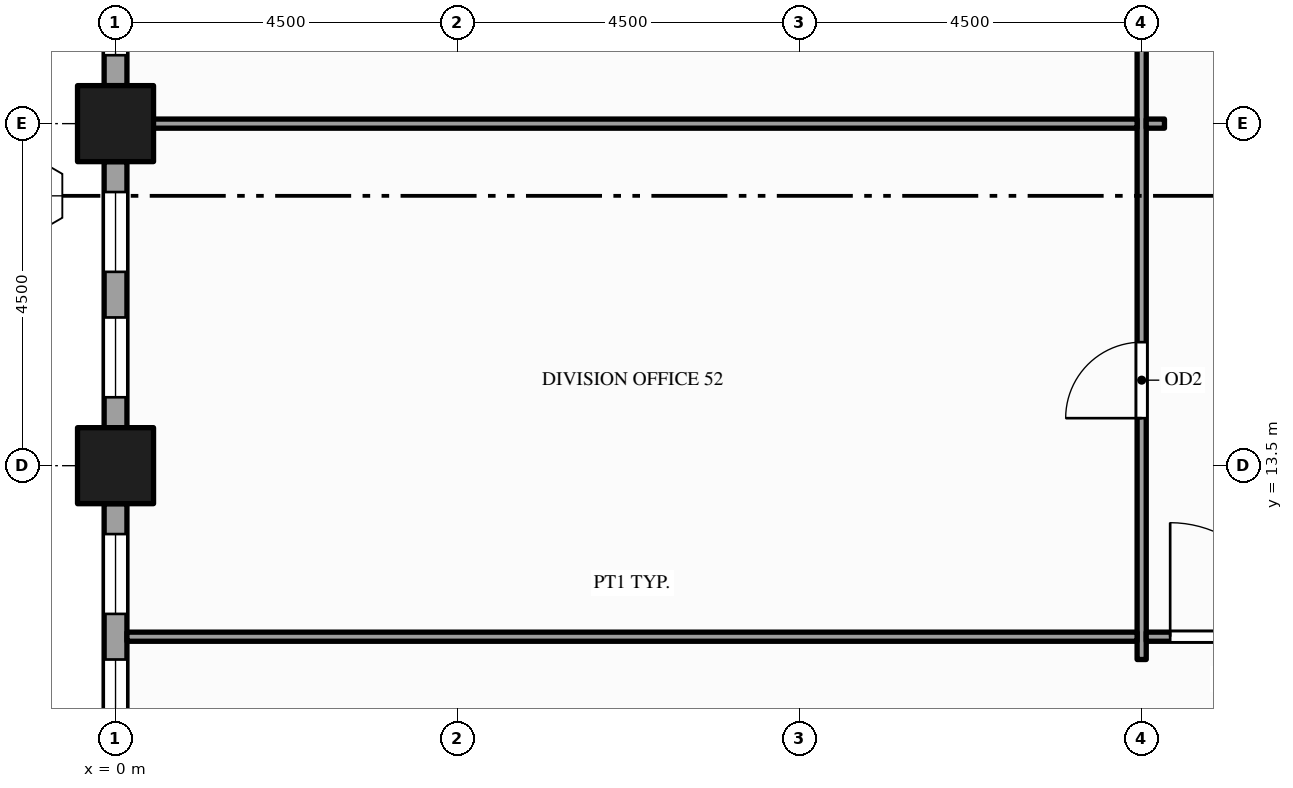
"""IFC4 building model, lengths in metres.
Left out: names, types, materials, properties, quantities, classifications, styles, units other than length and angle.
Written with IfcOpenShell. Run it as: python <this file> out.ifc"""

import sys

from ifc_helpers import new_model, si_unit, direction, frame, frame_2d, origin, origin_2d, place, context, subcontext, project, spatial, rectangle, hollow_rectangle, extrude, element, fill, save


model = new_model("IFC4")
c1 = context("Model", 3, precision=1e-05, world=origin(), true_north=direction((0.0, 1.0)))
c2 = subcontext(c1, "Body", "Model", "MODEL_VIEW")
j1 = project(units=[si_unit("LENGTHUNIT", "METRE"), si_unit("PLANEANGLEUNIT", "RADIAN")], contexts=[c1])
p1 = place(None, origin())
s1 = spatial("IfcSite", under=j1, at=p1, CompositionType="ELEMENT")
p2 = place(p1, origin())
s2 = spatial("IfcBuilding", under=s1, at=p2, CompositionType="ELEMENT")
p3 = place(p2, frame((0.0, 0.0, 119.0)))
s3 = spatial("IfcBuildingStorey", under=s2, at=p3, CompositionType="ELEMENT", Elevation=119.0)
for number, where, z_axis, x_axis in (
    (1, (0.0, 13.5, -0.15), (0.0, 0.0, 1.0), (1.0, 0.0, 0.0)),
    (2, (0.0, 18.0, -0.15), (0.0, 0.0, 1.0), (1.0, 0.0, 0.0)),
):
    element("IfcColumn", number, at=place(p3, frame(where, z_axis=z_axis, x_axis=x_axis)), inside=s3, PredefinedType="COLUMN", context=c2, shape_type="SweptSolid", body=[
        extrude(hollow_rectangle(XDim=1.0, YDim=1.0, WallThickness=0.05, at=origin_2d()), origin(), (0.0, 0.0, 1.0), 4.0),
    ])
p4 = place(p3, frame((0.0, 22.0, 0.0), z_axis=(0.0, 0.0, 1.0), x_axis=(0.0, -1.0, 0.0)))
e3 = element("IfcWall", 3, at=p4, inside=s3, PredefinedType="STANDARD", context=c2, shape_type="SweptSolid", body=[
    extrude(rectangle(XDim=3.5, YDim=0.3, at=frame_2d((1.75, 0.0))), origin(), (0.0, 0.0, 1.0), 3.154),
])
p5 = place(p4, frame((0.4, 0.0, 0.9)))
e4 = element("IfcOpeningElement", 4, at=p5, cuts=e3, PredefinedType="OPENING", context=c2, shape_type="SweptSolid", body=[
    extrude(rectangle(XDim=1.05, YDim=2.0, at=frame_2d((0.525, 1.0))), frame((0.0, 0.16, 0.0), z_axis=(0.0, -1.0, 0.0), x_axis=(1.0, 0.0, 0.0)), (0.0, 0.0, 1.0), 0.32),
])
p6 = place(p4, frame((2.05, 0.0, 0.9)))
e5 = element("IfcOpeningElement", 5, at=p6, cuts=e3, PredefinedType="OPENING", context=c2, shape_type="SweptSolid", body=[
    extrude(rectangle(XDim=1.05, YDim=2.0, at=frame_2d((0.525, 1.0))), frame((0.0, 0.16, 0.0), z_axis=(0.0, -1.0, 0.0), x_axis=(1.0, 0.0, 0.0)), (0.0, 0.0, 1.0), 0.32),
])
p7 = place(p3, frame((0.0, 17.5, 0.0), z_axis=(0.0, 0.0, 1.0), x_axis=(0.0, -1.0, 0.0)))
e6 = element("IfcWall", 6, at=p7, inside=s3, PredefinedType="STANDARD", context=c2, shape_type="SweptSolid", body=[
    extrude(rectangle(XDim=3.5, YDim=0.3, at=frame_2d((1.75, 0.0))), origin(), (0.0, 0.0, 1.0), 3.154),
])
p8 = place(p7, frame((0.4, 0.0, 0.9)))
e7 = element("IfcOpeningElement", 7, at=p8, cuts=e6, PredefinedType="OPENING", context=c2, shape_type="SweptSolid", body=[
    extrude(rectangle(XDim=1.05, YDim=2.0, at=frame_2d((0.525, 1.0))), frame((0.0, 0.16, 0.0), z_axis=(0.0, -1.0, 0.0), x_axis=(1.0, 0.0, 0.0)), (0.0, 0.0, 1.0), 0.32),
])
p9 = place(p7, frame((2.05, 0.0, 0.9)))
e8 = element("IfcOpeningElement", 8, at=p9, cuts=e6, PredefinedType="OPENING", context=c2, shape_type="SweptSolid", body=[
    extrude(rectangle(XDim=1.05, YDim=2.0, at=frame_2d((0.525, 1.0))), frame((0.0, 0.16, 0.0), z_axis=(0.0, -1.0, 0.0), x_axis=(1.0, 0.0, 0.0)), (0.0, 0.0, 1.0), 0.32),
])
p10 = place(p3, frame((0.0, 13.0, 0.0), z_axis=(0.0, 0.0, 1.0), x_axis=(0.0, -1.0, 0.0)))
e9 = element("IfcWall", 9, at=p10, inside=s3, PredefinedType="STANDARD", context=c2, shape_type="SweptSolid", body=[
    extrude(rectangle(XDim=3.5, YDim=0.3, at=frame_2d((1.75, 0.0))), origin(), (0.0, 0.0, 1.0), 3.154),
])
p11 = place(p10, frame((0.4, 0.0, 0.9)))
e10 = element("IfcOpeningElement", 10, at=p11, cuts=e9, PredefinedType="OPENING", context=c2, shape_type="SweptSolid", body=[
    extrude(rectangle(XDim=1.05, YDim=2.0, at=frame_2d((0.525, 1.0))), frame((0.0, 0.16, 0.0), z_axis=(0.0, -1.0, 0.0), x_axis=(1.0, 0.0, 0.0)), (0.0, 0.0, 1.0), 0.32),
])
p12 = place(p10, frame((2.05, 0.0, 0.9)))
e11 = element("IfcOpeningElement", 11, at=p12, cuts=e9, PredefinedType="OPENING", context=c2, shape_type="SweptSolid", body=[
    extrude(rectangle(XDim=1.05, YDim=2.0, at=frame_2d((0.525, 1.0))), frame((0.0, 0.16, 0.0), z_axis=(0.0, -1.0, 0.0), x_axis=(1.0, 0.0, 0.0)), (0.0, 0.0, 1.0), 0.32),
])
p13 = place(p3, frame((13.5, 10.95, 0.0), z_axis=(0.0, 0.0, 1.0), x_axis=(0.0, 1.0, 0.0)))
e12 = element("IfcWall", 12, at=p13, inside=s3, PredefinedType="PARTITIONING", context=c2, shape_type="SweptSolid", body=[
    extrude(rectangle(XDim=20.85, YDim=0.12, at=frame_2d((10.425, 0.0))), origin(), (0.0, 0.0, 1.0), 2.6),
])
p14 = place(p13, frame((3.175, 0.0, 0.0)))
e13 = element("IfcOpeningElement", 13, at=p14, cuts=e12, PredefinedType="OPENING", context=c2, shape_type="SweptSolid", body=[
    extrude(rectangle(XDim=1.0, YDim=2.1, at=frame_2d((0.5, 1.05))), frame((0.0, 0.07, 0.0), z_axis=(0.0, -1.0, 0.0), x_axis=(1.0, 0.0, 0.0)), (0.0, 0.0, 1.0), 0.14),
])
p15 = place(p13, frame((10.68, 0.0, 0.0)))
e14 = element("IfcOpeningElement", 14, at=p15, cuts=e12, PredefinedType="OPENING", context=c2, shape_type="SweptSolid", body=[
    extrude(rectangle(XDim=1.8, YDim=2.1, at=frame_2d((0.9, 1.05))), frame((0.0, 0.07, 0.0), z_axis=(0.0, -1.0, 0.0), x_axis=(1.0, 0.0, 0.0)), (0.0, 0.0, 1.0), 0.14),
])
p16 = place(p3, frame((0.15, 11.25, 0.0), z_axis=(0.0, 0.0, 1.0), x_axis=(1.0, 0.0, 0.0)))
e15 = element("IfcWall", 15, at=p16, inside=s3, PredefinedType="PARTITIONING", context=c2, shape_type="SweptSolid", body=[
    extrude(rectangle(XDim=13.29, YDim=0.12, at=frame_2d((6.645, 0.0))), origin(), (0.0, 0.0, 1.0), 2.938),
])
p17 = place(p3, frame((13.56, 11.25, 0.0), z_axis=(0.0, 0.0, 1.0), x_axis=(1.0, 0.0, 0.0)))
e16 = element("IfcWall", 16, at=p17, inside=s3, PredefinedType="PARTITIONING", context=c2, shape_type="SweptSolid", body=[
    extrude(rectangle(XDim=2.13, YDim=0.12, at=frame_2d((1.065, 0.0))), origin(), (0.0, 0.0, 1.0), 2.938),
])
p18 = place(p17, frame((0.315, 0.0, 0.0)))
e17 = element("IfcOpeningElement", 17, at=p18, cuts=e16, PredefinedType="OPENING", context=c2, shape_type="SweptSolid", body=[
    extrude(rectangle(XDim=1.5, YDim=2.1, at=frame_2d((0.75, 1.05))), frame((0.0, 0.07, 0.0), z_axis=(0.0, -1.0, 0.0), x_axis=(1.0, 0.0, 0.0)), (0.0, 0.0, 1.0), 0.14),
])
p19 = place(p3, frame((0.15, 18.0, 0.0), z_axis=(0.0, 0.0, 1.0), x_axis=(1.0, 0.0, 0.0)))
e18 = element("IfcWall", 18, at=p19, inside=s3, PredefinedType="PARTITIONING", context=c2, shape_type="SweptSolid", body=[
    extrude(rectangle(XDim=13.29, YDim=0.12, at=frame_2d((6.645, 0.0))), origin(), (0.0, 0.0, 1.0), 2.938),
])
p20 = place(p3, frame((13.56, 18.0, 0.0), z_axis=(0.0, 0.0, 1.0), x_axis=(1.0, 0.0, 0.0)))
e19 = element("IfcWall", 19, at=p20, inside=s3, PredefinedType="PARTITIONING", context=c2, shape_type="SweptSolid", body=[
    extrude(rectangle(XDim=0.24, YDim=0.12, at=frame_2d((0.12, 0.0))), origin(), (0.0, 0.0, 1.0), 2.938),
])
p21 = place(p6, origin())
e20 = element("IfcWindow", 20, at=p21, inside=s3, PartitioningType="SINGLE_PANEL", PredefinedType="WINDOW", context=c2, shape_type="SweptSolid", body=[
    extrude(rectangle(XDim=1.05, YDim=2.0, at=frame_2d((0.525, 1.0))), frame((0.0, 0.03, 0.0), z_axis=(0.0, -1.0, 0.0), x_axis=(1.0, 0.0, 0.0)), (0.0, 0.0, 1.0), 0.06),
])
fill(e5, e20)
p22 = place(p8, origin())
e21 = element("IfcWindow", 21, at=p22, inside=s3, PartitioningType="SINGLE_PANEL", PredefinedType="WINDOW", context=c2, shape_type="SweptSolid", body=[
    extrude(rectangle(XDim=1.05, YDim=2.0, at=frame_2d((0.525, 1.0))), frame((0.0, 0.03, 0.0), z_axis=(0.0, -1.0, 0.0), x_axis=(1.0, 0.0, 0.0)), (0.0, 0.0, 1.0), 0.06),
])
fill(e7, e21)
p23 = place(p9, origin())
e22 = element("IfcWindow", 22, at=p23, inside=s3, PartitioningType="SINGLE_PANEL", PredefinedType="WINDOW", context=c2, shape_type="SweptSolid", body=[
    extrude(rectangle(XDim=1.05, YDim=2.0, at=frame_2d((0.525, 1.0))), frame((0.0, 0.03, 0.0), z_axis=(0.0, -1.0, 0.0), x_axis=(1.0, 0.0, 0.0)), (0.0, 0.0, 1.0), 0.06),
])
fill(e8, e22)
p24 = place(p11, origin())
e23 = element("IfcWindow", 23, at=p24, inside=s3, PartitioningType="SINGLE_PANEL", PredefinedType="WINDOW", context=c2, shape_type="SweptSolid", body=[
    extrude(rectangle(XDim=1.05, YDim=2.0, at=frame_2d((0.525, 1.0))), frame((0.0, 0.03, 0.0), z_axis=(0.0, -1.0, 0.0), x_axis=(1.0, 0.0, 0.0)), (0.0, 0.0, 1.0), 0.06),
])
fill(e10, e23)
p25 = place(p12, origin())
e24 = element("IfcWindow", 24, at=p25, inside=s3, PartitioningType="SINGLE_PANEL", PredefinedType="WINDOW", context=c2, shape_type="SweptSolid", body=[
    extrude(rectangle(XDim=1.05, YDim=2.0, at=frame_2d((0.525, 1.0))), frame((0.0, 0.03, 0.0), z_axis=(0.0, -1.0, 0.0), x_axis=(1.0, 0.0, 0.0)), (0.0, 0.0, 1.0), 0.06),
])
fill(e11, e24)
p26 = place(p18, origin())
e25 = element("IfcDoor", 25, at=p26, inside=s3, OperationType="SINGLE_SWING_LEFT", PredefinedType="DOOR", context=c2, shape_type="SweptSolid", body=[
    extrude(rectangle(XDim=1.5, YDim=2.1, at=frame_2d((0.75, 1.05))), frame((0.0, 0.025, 0.0), z_axis=(0.0, -1.0, 0.0), x_axis=(1.0, 0.0, 0.0)), (0.0, 0.0, 1.0), 0.05),
])
fill(e17, e25)
p27 = place(p14, origin())
e26 = element("IfcDoor", 26, at=p27, inside=s3, OperationType="SINGLE_SWING_LEFT", PredefinedType="DOOR", context=c2, shape_type="SweptSolid", body=[
    extrude(rectangle(XDim=1.0, YDim=2.1, at=frame_2d((0.5, 1.05))), frame((0.0, 0.025, 0.0), z_axis=(0.0, -1.0, 0.0), x_axis=(1.0, 0.0, 0.0)), (0.0, 0.0, 1.0), 0.05),
])
fill(e13, e26)
save(model, sys.argv[1])
